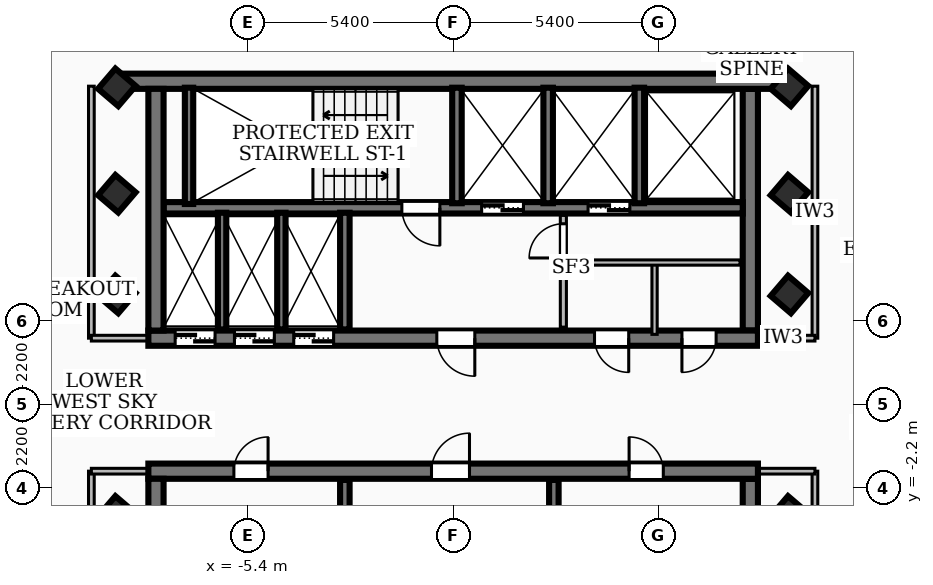
"""IFC4 building model, lengths in metres.
Left out: names, types, materials, properties, quantities, classifications, styles, units other than length and angle.
Written with IfcOpenShell. Run it as: python <this file> out.ifc"""

import sys

from ifc_helpers import new_model, si_unit, direction, frame, frame_2d, origin, origin_2d, place, context, subcontext, project, spatial, rectangle, extrude, element, fill, save


model = new_model("IFC4")
c1 = context("Model", 3, precision=1e-05, world=origin(), true_north=direction((0.0, 1.0)))
c2 = subcontext(c1, "Body", "Model", "MODEL_VIEW")
j1 = project(units=[si_unit("LENGTHUNIT", "METRE"), si_unit("PLANEANGLEUNIT", "RADIAN")], contexts=[c1])
p1 = place(None, origin())
s1 = spatial("IfcSite", under=j1, at=p1, CompositionType="ELEMENT")
p2 = place(p1, origin())
s2 = spatial("IfcBuilding", under=s1, at=p2, CompositionType="ELEMENT")
p3 = place(p2, frame((0.0, 0.0, 254.34)))
s3 = spatial("IfcBuildingStorey", under=s2, at=p3, CompositionType="ELEMENT", Elevation=254.34)
p4 = place(p3, frame((-8.78, 8.51, 0.0), z_axis=(0.0, 0.0, 1.0), x_axis=(1.0, 0.0, 0.0)))
e1 = element("IfcWall", 1, at=p4, inside=s3, PredefinedType="SHEAR", context=c2, shape_type="SweptSolid", body=[
    extrude(rectangle(XDim=17.56, YDim=0.4, at=frame_2d((8.78, 0.0))), origin(), (0.0, 0.0, 1.0), 3.16),
])
p5 = place(p3, frame((8.02, 1.75, 0.0), z_axis=(0.0, 0.0, 1.0), x_axis=(-1.0, 0.0, 0.0)))
e2 = element("IfcWall", 2, at=p5, inside=s3, PredefinedType="SHEAR", context=c2, shape_type="SweptSolid", body=[
    extrude(rectangle(XDim=16.04, YDim=0.4, at=frame_2d((8.02, 0.0))), origin(), (0.0, 0.0, 1.0), 3.16),
])
p6 = place(p5, frame((7.45, 0.0, 0.0)))
e3 = element("IfcOpeningElement", 3, at=p6, cuts=e2, PredefinedType="OPENING", context=c2, shape_type="SweptSolid", body=[
    extrude(rectangle(XDim=1.0, YDim=2.1, at=frame_2d((0.5, 1.05))), frame((0.0, 0.21, 0.0), z_axis=(0.0, -1.0, 0.0), x_axis=(1.0, 0.0, 0.0)), (0.0, 0.0, 1.0), 0.42),
])
p7 = place(p5, frame((14.285, 0.0, 0.0)))
e4 = element("IfcOpeningElement", 4, at=p7, cuts=e2, PredefinedType="OPENING", context=c2, shape_type="SweptSolid", body=[
    extrude(rectangle(XDim=1.05, YDim=2.15, at=frame_2d((0.525, 1.075))), frame((0.0, 0.21, 0.0), z_axis=(0.0, -1.0, 0.0), x_axis=(1.0, 0.0, 0.0)), (0.0, 0.0, 1.0), 0.42),
])
p8 = place(p5, frame((12.725, 0.0, 0.0)))
e5 = element("IfcOpeningElement", 5, at=p8, cuts=e2, PredefinedType="OPENING", context=c2, shape_type="SweptSolid", body=[
    extrude(rectangle(XDim=1.05, YDim=2.15, at=frame_2d((0.525, 1.075))), frame((0.0, 0.21, 0.0), z_axis=(0.0, -1.0, 0.0), x_axis=(1.0, 0.0, 0.0)), (0.0, 0.0, 1.0), 0.42),
])
p9 = place(p5, frame((11.165, 0.0, 0.0)))
e6 = element("IfcOpeningElement", 6, at=p9, cuts=e2, PredefinedType="OPENING", context=c2, shape_type="SweptSolid", body=[
    extrude(rectangle(XDim=1.05, YDim=2.15, at=frame_2d((0.525, 1.075))), frame((0.0, 0.21, 0.0), z_axis=(0.0, -1.0, 0.0), x_axis=(1.0, 0.0, 0.0)), (0.0, 0.0, 1.0), 0.42),
])
p10 = place(p5, frame((3.4, 0.0, 0.0)))
e7 = element("IfcOpeningElement", 7, at=p10, cuts=e2, PredefinedType="OPENING", context=c2, shape_type="SweptSolid", body=[
    extrude(rectangle(XDim=0.9, YDim=2.06, at=frame_2d((0.45, 1.03))), frame((0.0, 0.21, 0.0), z_axis=(0.0, -1.0, 0.0), x_axis=(1.0, 0.0, 0.0)), (0.0, 0.0, 1.0), 0.42),
])
p11 = place(p5, frame((1.1, 0.0, 0.0)))
e8 = element("IfcOpeningElement", 8, at=p11, cuts=e2, PredefinedType="OPENING", context=c2, shape_type="SweptSolid", body=[
    extrude(rectangle(XDim=0.9, YDim=2.06, at=frame_2d((0.45, 1.03))), frame((0.0, 0.21, 0.0), z_axis=(0.0, -1.0, 0.0), x_axis=(1.0, 0.0, 0.0)), (0.0, 0.0, 1.0), 0.42),
])
for number, where, z_axis, x_axis in (
    (9, (-7.82, 1.95, 0.0), (0.0, 0.0, 1.0), (0.0, 1.0, 0.0)),
    (10, (7.82, 8.31, 0.0), (0.0, 0.0, 1.0), (0.0, -1.0, 0.0)),
):
    element("IfcWall", number, at=place(p3, frame(where, z_axis=z_axis, x_axis=x_axis)), inside=s3, PredefinedType="SHEAR", context=c2, shape_type="SweptSolid", body=[
        extrude(rectangle(XDim=6.36, YDim=0.4, at=frame_2d((3.18, 0.0))), origin(), (0.0, 0.0, 1.0), 3.16),
    ])
p12 = place(p3, frame((7.62, 5.18, 0.0), z_axis=(0.0, 0.0, 1.0), x_axis=(-1.0, 0.0, 0.0)))
e11 = element("IfcWall", 11, at=p12, inside=s3, PredefinedType="SOLIDWALL", context=c2, shape_type="SweptSolid", body=[
    extrude(rectangle(XDim=15.24, YDim=0.3, at=frame_2d((7.62, 0.0))), origin(), (0.0, 0.0, 1.0), 3.16),
])
p13 = place(p12, frame((5.77, 0.0, 0.0)))
e12 = element("IfcOpeningElement", 12, at=p13, cuts=e11, PredefinedType="OPENING", context=c2, shape_type="SweptSolid", body=[
    extrude(rectangle(XDim=1.1, YDim=2.15, at=frame_2d((0.55, 1.075))), frame((0.0, 0.16, 0.0), z_axis=(0.0, -1.0, 0.0), x_axis=(1.0, 0.0, 0.0)), (0.0, 0.0, 1.0), 0.32),
])
p14 = place(p12, frame((2.97, 0.0, 0.0)))
e13 = element("IfcOpeningElement", 13, at=p14, cuts=e11, PredefinedType="OPENING", context=c2, shape_type="SweptSolid", body=[
    extrude(rectangle(XDim=1.1, YDim=2.15, at=frame_2d((0.55, 1.075))), frame((0.0, 0.16, 0.0), z_axis=(0.0, -1.0, 0.0), x_axis=(1.0, 0.0, 0.0)), (0.0, 0.0, 1.0), 0.32),
])
p15 = place(p12, frame((7.97, 0.0, 0.0)))
e14 = element("IfcOpeningElement", 14, at=p15, cuts=e11, PredefinedType="OPENING", context=c2, shape_type="SweptSolid", body=[
    extrude(rectangle(XDim=1.0, YDim=2.1, at=frame_2d((0.5, 1.05))), frame((0.0, 0.16, 0.0), z_axis=(0.0, -1.0, 0.0), x_axis=(1.0, 0.0, 0.0)), (0.0, 0.0, 1.0), 0.32),
])
p16 = place(p3, frame((-8.02, -1.75, 0.0), z_axis=(0.0, 0.0, 1.0), x_axis=(1.0, 0.0, 0.0)))
e15 = element("IfcWall", 15, at=p16, inside=s3, PredefinedType="SHEAR", context=c2, shape_type="SweptSolid", body=[
    extrude(rectangle(XDim=16.04, YDim=0.4, at=frame_2d((8.02, 0.0))), origin(), (0.0, 0.0, 1.0), 3.16),
])
p17 = place(p16, frame((7.45, 0.0, 0.0)))
e16 = element("IfcOpeningElement", 16, at=p17, cuts=e15, PredefinedType="OPENING", context=c2, shape_type="SweptSolid", body=[
    extrude(rectangle(XDim=1.0, YDim=2.1, at=frame_2d((0.5, 1.05))), frame((0.0, 0.21, 0.0), z_axis=(0.0, -1.0, 0.0), x_axis=(1.0, 0.0, 0.0)), (0.0, 0.0, 1.0), 0.42),
])
p18 = place(p16, frame((12.65, 0.0, 0.0)))
e17 = element("IfcOpeningElement", 17, at=p18, cuts=e15, PredefinedType="OPENING", context=c2, shape_type="SweptSolid", body=[
    extrude(rectangle(XDim=0.9, YDim=2.06, at=frame_2d((0.45, 1.03))), frame((0.0, 0.21, 0.0), z_axis=(0.0, -1.0, 0.0), x_axis=(1.0, 0.0, 0.0)), (0.0, 0.0, 1.0), 0.42),
])
p19 = place(p16, frame((2.25, 0.0, 0.0)))
e18 = element("IfcOpeningElement", 18, at=p19, cuts=e15, PredefinedType="OPENING", context=c2, shape_type="SweptSolid", body=[
    extrude(rectangle(XDim=0.9, YDim=2.06, at=frame_2d((0.45, 1.03))), frame((0.0, 0.21, 0.0), z_axis=(0.0, -1.0, 0.0), x_axis=(1.0, 0.0, 0.0)), (0.0, 0.0, 1.0), 0.42),
])
for number, where, z_axis, x_axis in (
    (19, (-7.82, -8.31, 0.0), (0.0, 0.0, 1.0), (0.0, 1.0, 0.0)),
    (20, (7.82, -1.95, 0.0), (0.0, 0.0, 1.0), (0.0, -1.0, 0.0)),
):
    element("IfcWall", number, at=place(p3, frame(where, z_axis=z_axis, x_axis=x_axis)), inside=s3, PredefinedType="SHEAR", context=c2, shape_type="SweptSolid", body=[
        extrude(rectangle(XDim=6.36, YDim=0.4, at=frame_2d((3.18, 0.0))), origin(), (0.0, 0.0, 1.0), 3.16),
    ])
p20 = place(p3, frame((-6.95, 5.28, 0.0), z_axis=(0.0, 0.0, 1.0), x_axis=(0.0, 1.0, 0.0)))
e21 = element("IfcWall", 21, at=p20, inside=s3, PredefinedType="SOLIDWALL", context=c2, shape_type="SweptSolid", body=[
    extrude(rectangle(XDim=3.06, YDim=0.22, at=frame_2d((1.53, 0.0))), origin(), (0.0, 0.0, 1.0), 3.16),
])
for number, where, z_axis, x_axis in (
    (22, (0.1, 5.3, 0.0), (0.0, 0.0, 1.0), (0.0, 1.0, 0.0)),
    (23, (2.5, 5.3, 0.0), (0.0, 0.0, 1.0), (0.0, 1.0, 0.0)),
    (24, (4.9, 5.3, 0.0), (0.0, 0.0, 1.0), (0.0, 1.0, 0.0)),
):
    element("IfcWall", number, at=place(p3, frame(where, z_axis=z_axis, x_axis=x_axis)), inside=s3, PredefinedType="SOLIDWALL", context=c2, shape_type="SweptSolid", body=[
        extrude(rectangle(XDim=3.04, YDim=0.25, at=frame_2d((1.52, 0.0))), origin(), (0.0, 0.0, 1.0), 3.16),
    ])
for number, where, z_axis, x_axis in (
    (25, (-2.85, 1.98, 0.0), (0.0, 0.0, 1.0), (0.0, 1.0, 0.0)),
    (26, (-2.85, -5.05, 0.0), (0.0, 0.0, 1.0), (0.0, 1.0, 0.0)),
    (27, (2.65, -5.05, 0.0), (0.0, 0.0, 1.0), (0.0, 1.0, 0.0)),
):
    element("IfcWall", number, at=place(p3, frame(where, z_axis=z_axis, x_axis=x_axis)), inside=s3, PredefinedType="SOLIDWALL", context=c2, shape_type="SweptSolid", body=[
        extrude(rectangle(XDim=3.07, YDim=0.25, at=frame_2d((1.535, 0.0))), origin(), (0.0, 0.0, 1.0), 3.16),
    ])
for number, where, z_axis, x_axis in (
    (28, (-6.08, 1.98, 0.0), (0.0, 0.0, 1.0), (0.0, 1.0, 0.0)),
    (29, (-4.52, 1.98, 0.0), (0.0, 0.0, 1.0), (0.0, 1.0, 0.0)),
):
    element("IfcWall", number, at=place(p3, frame(where, z_axis=z_axis, x_axis=x_axis)), inside=s3, PredefinedType="SOLIDWALL", context=c2, shape_type="SweptSolid", body=[
        extrude(rectangle(XDim=3.07, YDim=0.22, at=frame_2d((1.535, 0.0))), origin(), (0.0, 0.0, 1.0), 3.16),
    ])
for number, where, z_axis, x_axis in (
    (30, (-8.85, -2.9, 0.0), (0.0, 0.0, 1.0), (0.65, 0.76, 0.0)),
    (31, (-8.85, 2.9, 0.0), (0.0, 0.0, 1.0), (0.65, 0.76, 0.0)),
    (32, (-8.85, 5.55, 0.0), (0.0, 0.0, 1.0), (0.65, 0.76, 0.0)),
    (33, (8.85, -2.9, 0.0), (0.0, 0.0, 1.0), (0.65, 0.76, 0.0)),
    (34, (8.85, 2.9, 0.0), (0.0, 0.0, 1.0), (0.65, 0.76, 0.0)),
    (35, (8.85, 5.55, 0.0), (0.0, 0.0, 1.0), (0.65, 0.76, 0.0)),
    (36, (-8.85, 8.35, 0.0), (0.0, 0.0, 1.0), (0.65, 0.76, 0.0)),
    (37, (8.85, 8.35, 0.0), (0.0, 0.0, 1.0), (0.65, 0.76, 0.0)),
):
    element("IfcColumn", number, at=place(p3, frame(where, z_axis=z_axis, x_axis=x_axis)), inside=s3, PredefinedType="COLUMN", context=c2, shape_type="SweptSolid", body=[
        extrude(rectangle(XDim=0.7, YDim=0.7, at=origin_2d()), origin(), (0.0, 0.0, 1.0), 3.42),
    ])
p21 = place(p3, frame((0.451, -19.406, 0.0), z_axis=(0.0, 0.0, 1.0), x_axis=(-0.759723103319, 0.650246727238, 0.0)))
e38 = element("IfcWall", 38, at=p21, inside=s3, PredefinedType="SOLIDWALL", context=c2, shape_type="SweptSolid", body=[
    extrude(rectangle(XDim=25.922, YDim=0.2, at=frame_2d((12.961, 0.0))), origin(), (0.0, 0.0, 1.0), 3.16),
])
p22 = place(p21, frame((19.32, 0.0, 0.85)))
e39 = element("IfcOpeningElement", 39, at=p22, cuts=e38, PredefinedType="OPENING", context=c2, shape_type="SweptSolid", body=[
    extrude(rectangle(XDim=1.8, YDim=2.0, at=frame_2d((0.9, 1.0))), frame((0.0, 0.11, 0.0), z_axis=(0.0, -1.0, 0.0), x_axis=(1.0, 0.0, 0.0)), (0.0, 0.0, 1.0), 0.22),
])
p23 = place(p3, frame((2.9, 2.04, 0.0), z_axis=(0.0, 0.0, 1.0), x_axis=(0.0, 1.0, 0.0)))
e40 = element("IfcWall", 40, at=p23, inside=s3, PredefinedType="PARTITIONING", context=c2, shape_type="SweptSolid", body=[
    extrude(rectangle(XDim=2.94, YDim=0.16, at=frame_2d((1.47, 0.0))), origin(), (0.0, 0.0, 1.0), 2.39),
])
p24 = place(p23, frame((1.82, 0.0, 0.0)))
e41 = element("IfcOpeningElement", 41, at=p24, cuts=e40, PredefinedType="OPENING", context=c2, shape_type="SweptSolid", body=[
    extrude(rectangle(XDim=0.9, YDim=2.06, at=frame_2d((0.45, 1.03))), frame((0.0, 0.09, 0.0), z_axis=(0.0, -1.0, 0.0), x_axis=(1.0, 0.0, 0.0)), (0.0, 0.0, 1.0), 0.18),
])
p25 = place(p3, frame((2.9, 3.74, 0.0), z_axis=(0.0, 0.0, 1.0), x_axis=(1.0, 0.0, 0.0)))
e42 = element("IfcWall", 42, at=p25, inside=s3, PredefinedType="PARTITIONING", context=c2, shape_type="SweptSolid", body=[
    extrude(rectangle(XDim=4.65, YDim=0.138, at=frame_2d((2.325, 0.0))), origin(), (0.0, 0.0, 1.0), 3.16),
])
p26 = place(p3, frame((5.3, 1.85, 0.0), z_axis=(0.0, 0.0, 1.0), x_axis=(0.0, 1.0, 0.0)))
e43 = element("IfcWall", 43, at=p26, inside=s3, PredefinedType="PARTITIONING", context=c2, shape_type="SweptSolid", body=[
    extrude(rectangle(XDim=1.89, YDim=0.138, at=frame_2d((0.945, 0.0))), origin(), (0.0, 0.0, 1.0), 2.39),
])
p27 = place(p3, frame((-9.52, 1.75, 0.0), z_axis=(0.0, 0.0, 1.0), x_axis=(0.0, 1.0, 0.0)))
e44 = element("IfcWall", 44, at=p27, inside=s3, PredefinedType="PARTITIONING", context=c2, shape_type="SweptSolid", body=[
    extrude(rectangle(XDim=6.63, YDim=0.15, at=frame_2d((3.315, 0.0))), origin(), (0.0, 0.0, 1.0), 2.53),
])
p28 = place(p3, frame((-7.85, 1.75, 0.0), z_axis=(0.0, 0.0, 1.0), x_axis=(-1.0, 0.0, 0.0)))
e45 = element("IfcWall", 45, at=p28, inside=s3, PredefinedType="PARTITIONING", context=c2, shape_type="SweptSolid", body=[
    extrude(rectangle(XDim=1.67, YDim=0.15, at=frame_2d((0.835, 0.0))), origin(), (0.0, 0.0, 1.0), 2.39),
])
p29 = place(p3, frame((-9.52, -8.38, 0.0), z_axis=(0.0, 0.0, 1.0), x_axis=(0.0, 1.0, 0.0)))
e46 = element("IfcWall", 46, at=p29, inside=s3, PredefinedType="PARTITIONING", context=c2, shape_type="SweptSolid", body=[
    extrude(rectangle(XDim=6.63, YDim=0.15, at=frame_2d((3.315, 0.0))), origin(), (0.0, 0.0, 1.0), 3.16),
])
p30 = place(p3, frame((-7.85, -1.75, 0.0), z_axis=(0.0, 0.0, 1.0), x_axis=(-1.0, 0.0, 0.0)))
e47 = element("IfcWall", 47, at=p30, inside=s3, PredefinedType="PARTITIONING", context=c2, shape_type="SweptSolid", body=[
    extrude(rectangle(XDim=1.67, YDim=0.15, at=frame_2d((0.835, 0.0))), origin(), (0.0, 0.0, 1.0), 2.39),
])
p31 = place(p3, frame((9.52, 1.75, 0.0), z_axis=(0.0, 0.0, 1.0), x_axis=(0.0, 1.0, 0.0)))
e48 = element("IfcWall", 48, at=p31, inside=s3, PredefinedType="PARTITIONING", context=c2, shape_type="SweptSolid", body=[
    extrude(rectangle(XDim=6.63, YDim=0.15, at=frame_2d((3.315, 0.0))), origin(), (0.0, 0.0, 1.0), 3.16),
])
p32 = place(p3, frame((7.85, 1.75, 0.0), z_axis=(0.0, 0.0, 1.0), x_axis=(1.0, 0.0, 0.0)))
e49 = element("IfcWall", 49, at=p32, inside=s3, PredefinedType="PARTITIONING", context=c2, shape_type="SweptSolid", body=[
    extrude(rectangle(XDim=1.67, YDim=0.15, at=frame_2d((0.835, 0.0))), origin(), (0.0, 0.0, 1.0), 2.39),
])
p33 = place(p3, frame((9.52, -8.38, 0.0), z_axis=(0.0, 0.0, 1.0), x_axis=(0.0, 1.0, 0.0)))
e50 = element("IfcWall", 50, at=p33, inside=s3, PredefinedType="PARTITIONING", context=c2, shape_type="SweptSolid", body=[
    extrude(rectangle(XDim=6.63, YDim=0.15, at=frame_2d((3.315, 0.0))), origin(), (0.0, 0.0, 1.0), 2.53),
])
p34 = place(p3, frame((7.85, -1.75, 0.0), z_axis=(0.0, 0.0, 1.0), x_axis=(1.0, 0.0, 0.0)))
e51 = element("IfcWall", 51, at=p34, inside=s3, PredefinedType="PARTITIONING", context=c2, shape_type="SweptSolid", body=[
    extrude(rectangle(XDim=1.67, YDim=0.15, at=frame_2d((0.835, 0.0))), origin(), (0.0, 0.0, 1.0), 2.39),
])
p35 = place(p3, frame((16.372, 4.796, 0.0), z_axis=(0.0, 0.0, 1.0), x_axis=(-0.759640163548, 0.650343618348, 0.0)))
e52 = element("IfcWall", 52, at=p35, inside=s3, PredefinedType="PARTITIONING", context=c2, shape_type="SweptSolid", body=[
    extrude(rectangle(XDim=7.95, YDim=0.11, at=frame_2d((3.975, 0.0))), origin(), (0.0, 0.0, 1.0), 2.53),
])
p36 = place(p3, frame((6.252, 16.894, 0.0), z_axis=(0.0, 0.0, 1.0), x_axis=(0.759715677597, -0.650255403063, 0.0)))
e53 = element("IfcWall", 53, at=p36, inside=s3, PredefinedType="PARTITIONING", context=c2, shape_type="SweptSolid", body=[
    extrude(rectangle(XDim=12.571, YDim=0.11, at=frame_2d((6.285, 0.0))), origin(), (0.0, 0.0, 1.0), 2.53),
])
p37 = place(p36, frame((6.655, 0.0, 0.0)))
e54 = element("IfcOpeningElement", 54, at=p37, cuts=e53, PredefinedType="OPENING", context=c2, shape_type="SweptSolid", body=[
    extrude(rectangle(XDim=0.86, YDim=2.04, at=frame_2d((0.43, 1.02))), frame((0.0, 0.065, 0.0), z_axis=(0.0, -1.0, 0.0), x_axis=(1.0, 0.0, 0.0)), (0.0, 0.0, 1.0), 0.13),
])
p38 = place(p36, frame((5.455, 0.0, 0.0)))
e55 = element("IfcOpeningElement", 55, at=p38, cuts=e53, PredefinedType="OPENING", context=c2, shape_type="SweptSolid", body=[
    extrude(rectangle(XDim=0.86, YDim=2.04, at=frame_2d((0.43, 1.02))), frame((0.0, 0.065, 0.0), z_axis=(0.0, -1.0, 0.0), x_axis=(1.0, 0.0, 0.0)), (0.0, 0.0, 1.0), 0.13),
])
p39 = place(p3, frame((-17.437, 1.604, 0.0), z_axis=(0.0, 0.0, 1.0), x_axis=(0.650265099033, 0.759707378522, 0.0)))
e56 = element("IfcWall", 56, at=p39, inside=s3, PredefinedType="PARTITIONING", context=c2, shape_type="SweptSolid", body=[
    extrude(rectangle(XDim=20.139, YDim=0.11, at=frame_2d((10.07, 0.0))), origin(), (0.0, 0.0, 1.0), 2.53),
])
p40 = place(p39, frame((10.959, 0.0, 0.0)))
e57 = element("IfcOpeningElement", 57, at=p40, cuts=e56, PredefinedType="OPENING", context=c2, shape_type="SweptSolid", body=[
    extrude(rectangle(XDim=0.86, YDim=2.04, at=frame_2d((0.43, 1.02))), frame((0.0, 0.065, 0.0), z_axis=(0.0, -1.0, 0.0), x_axis=(1.0, 0.0, 0.0)), (0.0, 0.0, 1.0), 0.13),
])
p41 = place(p39, frame((9.519, 0.0, 0.0)))
e58 = element("IfcOpeningElement", 58, at=p41, cuts=e56, PredefinedType="OPENING", context=c2, shape_type="SweptSolid", body=[
    extrude(rectangle(XDim=0.86, YDim=2.04, at=frame_2d((0.43, 1.02))), frame((0.0, 0.065, 0.0), z_axis=(0.0, -1.0, 0.0), x_axis=(1.0, 0.0, 0.0)), (0.0, 0.0, 1.0), 0.13),
])
p42 = place(p3, frame((17.437, -1.604, 0.0), z_axis=(0.0, 0.0, 1.0), x_axis=(-0.650265099033, -0.759707378522, 0.0)))
e59 = element("IfcWall", 59, at=p42, inside=s3, PredefinedType="PARTITIONING", context=c2, shape_type="SweptSolid", body=[
    extrude(rectangle(XDim=20.139, YDim=0.11, at=frame_2d((10.07, 0.0))), origin(), (0.0, 0.0, 1.0), 2.53),
])
p43 = place(p42, frame((9.859, 0.0, 0.0)))
e60 = element("IfcOpeningElement", 60, at=p43, cuts=e59, PredefinedType="OPENING", context=c2, shape_type="SweptSolid", body=[
    extrude(rectangle(XDim=0.86, YDim=2.04, at=frame_2d((0.43, 1.02))), frame((0.0, 0.065, 0.0), z_axis=(0.0, -1.0, 0.0), x_axis=(1.0, 0.0, 0.0)), (0.0, 0.0, 1.0), 0.13),
])
p44 = place(p42, frame((8.419, 0.0, 0.0)))
e61 = element("IfcOpeningElement", 61, at=p44, cuts=e59, PredefinedType="OPENING", context=c2, shape_type="SweptSolid", body=[
    extrude(rectangle(XDim=0.86, YDim=2.04, at=frame_2d((0.43, 1.02))), frame((0.0, 0.065, 0.0), z_axis=(0.0, -1.0, 0.0), x_axis=(1.0, 0.0, 0.0)), (0.0, 0.0, 1.0), 0.13),
])
p45 = place(p6, origin())
e62 = element("IfcDoor", 62, at=p45, inside=s3, OperationType="SINGLE_SWING_LEFT", PredefinedType="DOOR", context=c2, shape_type="SweptSolid", body=[
    extrude(rectangle(XDim=1.0, YDim=2.1, at=frame_2d((0.5, 1.05))), frame((0.0, 0.025, 0.0), z_axis=(0.0, -1.0, 0.0), x_axis=(1.0, 0.0, 0.0)), (0.0, 0.0, 1.0), 0.05),
])
fill(e3, e62)
p46 = place(p17, origin())
e63 = element("IfcDoor", 63, at=p46, inside=s3, OperationType="SINGLE_SWING_RIGHT", PredefinedType="DOOR", context=c2, shape_type="SweptSolid", body=[
    extrude(rectangle(XDim=1.0, YDim=2.1, at=frame_2d((0.5, 1.05))), frame((0.0, 0.025, 0.0), z_axis=(0.0, -1.0, 0.0), x_axis=(1.0, 0.0, 0.0)), (0.0, 0.0, 1.0), 0.05),
])
fill(e16, e63)
p47 = place(p13, origin())
e64 = element("IfcDoor", 64, at=p47, inside=s3, OperationType="DOUBLE_DOOR_SLIDING", PredefinedType="DOOR", context=c2, shape_type="SweptSolid", body=[
    extrude(rectangle(XDim=1.1, YDim=2.15, at=frame_2d((0.55, 1.075))), frame((0.0, 0.025, 0.0), z_axis=(0.0, -1.0, 0.0), x_axis=(1.0, 0.0, 0.0)), (0.0, 0.0, 1.0), 0.05),
])
fill(e12, e64)
p48 = place(p14, origin())
e65 = element("IfcDoor", 65, at=p48, inside=s3, OperationType="DOUBLE_DOOR_SLIDING", PredefinedType="DOOR", context=c2, shape_type="SweptSolid", body=[
    extrude(rectangle(XDim=1.1, YDim=2.15, at=frame_2d((0.55, 1.075))), frame((0.0, 0.025, 0.0), z_axis=(0.0, -1.0, 0.0), x_axis=(1.0, 0.0, 0.0)), (0.0, 0.0, 1.0), 0.05),
])
fill(e13, e65)
p49 = place(p15, origin())
e66 = element("IfcDoor", 66, at=p49, inside=s3, OperationType="SINGLE_SWING_LEFT", PredefinedType="DOOR", context=c2, shape_type="SweptSolid", body=[
    extrude(rectangle(XDim=1.0, YDim=2.1, at=frame_2d((0.5, 1.05))), frame((0.0, 0.025, 0.0), z_axis=(0.0, -1.0, 0.0), x_axis=(1.0, 0.0, 0.0)), (0.0, 0.0, 1.0), 0.05),
])
fill(e14, e66)
p50 = place(p7, origin())
e67 = element("IfcDoor", 67, at=p50, inside=s3, OperationType="DOUBLE_DOOR_SLIDING", PredefinedType="DOOR", context=c2, shape_type="SweptSolid", body=[
    extrude(rectangle(XDim=1.05, YDim=2.15, at=frame_2d((0.525, 1.075))), frame((0.0, 0.025, 0.0), z_axis=(0.0, -1.0, 0.0), x_axis=(1.0, 0.0, 0.0)), (0.0, 0.0, 1.0), 0.05),
])
fill(e4, e67)
p51 = place(p8, origin())
e68 = element("IfcDoor", 68, at=p51, inside=s3, OperationType="DOUBLE_DOOR_SLIDING", PredefinedType="DOOR", context=c2, shape_type="SweptSolid", body=[
    extrude(rectangle(XDim=1.05, YDim=2.15, at=frame_2d((0.525, 1.075))), frame((0.0, 0.025, 0.0), z_axis=(0.0, -1.0, 0.0), x_axis=(1.0, 0.0, 0.0)), (0.0, 0.0, 1.0), 0.05),
])
fill(e5, e68)
p52 = place(p9, origin())
e69 = element("IfcDoor", 69, at=p52, inside=s3, OperationType="DOUBLE_DOOR_SLIDING", PredefinedType="DOOR", context=c2, shape_type="SweptSolid", body=[
    extrude(rectangle(XDim=1.05, YDim=2.15, at=frame_2d((0.525, 1.075))), frame((0.0, 0.025, 0.0), z_axis=(0.0, -1.0, 0.0), x_axis=(1.0, 0.0, 0.0)), (0.0, 0.0, 1.0), 0.05),
])
fill(e6, e69)
p53 = place(p18, origin())
e70 = element("IfcDoor", 70, at=p53, inside=s3, OperationType="SINGLE_SWING_LEFT", PredefinedType="DOOR", context=c2, shape_type="SweptSolid", body=[
    extrude(rectangle(XDim=0.9, YDim=2.06, at=frame_2d((0.45, 1.03))), frame((0.0, 0.025, 0.0), z_axis=(0.0, -1.0, 0.0), x_axis=(1.0, 0.0, 0.0)), (0.0, 0.0, 1.0), 0.05),
])
fill(e17, e70)
p54 = place(p19, origin())
e71 = element("IfcDoor", 71, at=p54, inside=s3, OperationType="SINGLE_SWING_RIGHT", PredefinedType="DOOR", context=c2, shape_type="SweptSolid", body=[
    extrude(rectangle(XDim=0.9, YDim=2.06, at=frame_2d((0.45, 1.03))), frame((0.0, 0.025, 0.0), z_axis=(0.0, -1.0, 0.0), x_axis=(1.0, 0.0, 0.0)), (0.0, 0.0, 1.0), 0.05),
])
fill(e18, e71)
p55 = place(p10, origin())
e72 = element("IfcDoor", 72, at=p55, inside=s3, OperationType="SINGLE_SWING_LEFT", PredefinedType="DOOR", context=c2, shape_type="SweptSolid", body=[
    extrude(rectangle(XDim=0.9, YDim=2.06, at=frame_2d((0.45, 1.03))), frame((0.0, 0.025, 0.0), z_axis=(0.0, -1.0, 0.0), x_axis=(1.0, 0.0, 0.0)), (0.0, 0.0, 1.0), 0.05),
])
fill(e7, e72)
p56 = place(p11, origin())
e73 = element("IfcDoor", 73, at=p56, inside=s3, OperationType="SINGLE_SWING_RIGHT", PredefinedType="DOOR", context=c2, shape_type="SweptSolid", body=[
    extrude(rectangle(XDim=0.9, YDim=2.06, at=frame_2d((0.45, 1.03))), frame((0.0, 0.025, 0.0), z_axis=(0.0, -1.0, 0.0), x_axis=(1.0, 0.0, 0.0)), (0.0, 0.0, 1.0), 0.05),
])
fill(e8, e73)
p57 = place(p24, origin())
e74 = element("IfcDoor", 74, at=p57, inside=s3, OperationType="SINGLE_SWING_LEFT", PredefinedType="DOOR", context=c2, shape_type="SweptSolid", body=[
    extrude(rectangle(XDim=0.9, YDim=2.06, at=frame_2d((0.45, 1.03))), frame((0.0, 0.025, 0.0), z_axis=(0.0, -1.0, 0.0), x_axis=(1.0, 0.0, 0.0)), (0.0, 0.0, 1.0), 0.05),
])
fill(e41, e74)
save(model, sys.argv[1])
